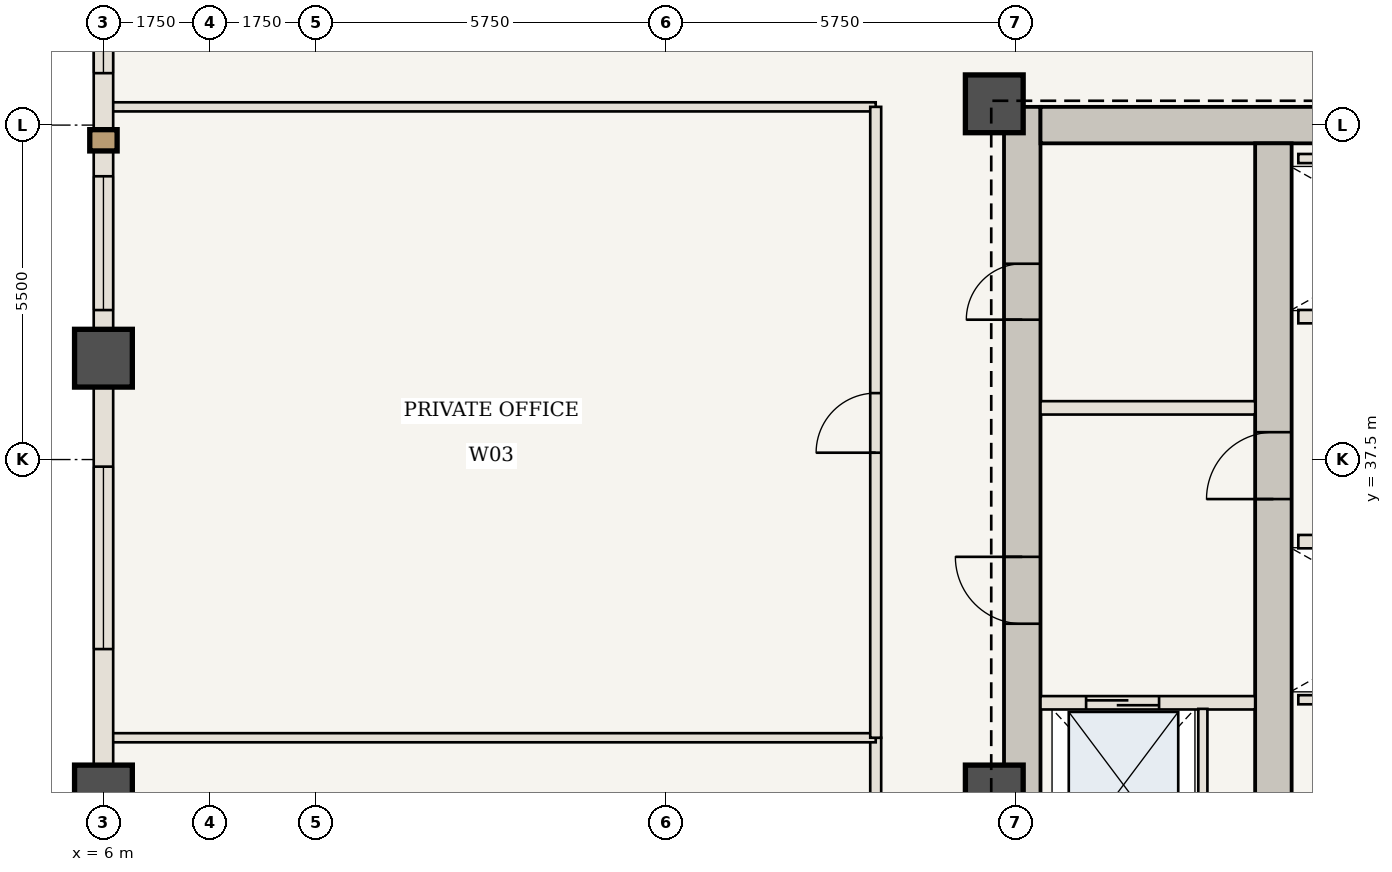
"""IFC4 building model, lengths in metres.
Left out: names, types, materials, properties, quantities, classifications, styles, units other than length and angle.
Written with IfcOpenShell. Run it as: python <this file> out.ifc"""

import sys

from ifc_helpers import new_model, si_unit, direction, frame, frame_2d, origin, origin_2d, place, context, subcontext, project, spatial, rectangle, extrude, element, fill, save


model = new_model("IFC4")
c1 = context("Model", 3, precision=1e-05, world=origin(), true_north=direction((0.0, 1.0)))
c2 = subcontext(c1, "Body", "Model", "MODEL_VIEW")
j1 = project(units=[si_unit("LENGTHUNIT", "METRE"), si_unit("PLANEANGLEUNIT", "RADIAN")], contexts=[c1])
p1 = place(None, origin())
s1 = spatial("IfcSite", under=j1, at=p1, CompositionType="ELEMENT")
p2 = place(p1, origin())
s2 = spatial("IfcBuilding", under=s1, at=p2, CompositionType="ELEMENT")
p3 = place(p2, frame((0.0, 0.0, 137.55)))
s3 = spatial("IfcBuildingStorey", under=s2, at=p3, CompositionType="ELEMENT", Elevation=137.55)
p4 = place(p3, frame((21.11, 30.6, 0.0), z_axis=(0.0, 0.0, 1.0), x_axis=(0.0, 1.0, 0.0)))
e1 = element("IfcWall", 1, at=p4, inside=s3, PredefinedType="SHEAR", context=c2, shape_type="SweptSolid", body=[
    extrude(rectangle(XDim=12.7, YDim=0.6, at=frame_2d((6.35, 0.0))), origin(), (0.0, 0.0, 1.0), 3.85),
])
p5 = place(p4, frame((4.2, 0.0, 0.0)))
e2 = element("IfcOpeningElement", 2, at=p5, cuts=e1, PredefinedType="OPENING", context=c2, shape_type="SweptSolid", body=[
    extrude(rectangle(XDim=1.1, YDim=2.15, at=frame_2d((0.55, 1.075))), frame((0.0, 0.31, 0.0), z_axis=(0.0, -1.0, 0.0), x_axis=(1.0, 0.0, 0.0)), (0.0, 0.0, 1.0), 0.62),
])
p6 = place(p4, frame((9.2, 0.0, 0.0)))
e3 = element("IfcOpeningElement", 3, at=p6, cuts=e1, PredefinedType="OPENING", context=c2, shape_type="SweptSolid", body=[
    extrude(rectangle(XDim=0.92, YDim=2.1, at=frame_2d((0.46, 1.05))), frame((0.0, 0.31, 0.0), z_axis=(0.0, -1.0, 0.0), x_axis=(1.0, 0.0, 0.0)), (0.0, 0.0, 1.0), 0.62),
])
p7 = place(p3, frame((21.41, 43.0, 0.0), z_axis=(0.0, 0.0, 1.0), x_axis=(1.0, 0.0, 0.0)))
e4 = element("IfcWall", 4, at=p7, inside=s3, PredefinedType="SHEAR", context=c2, shape_type="SweptSolid", body=[
    extrude(rectangle(XDim=8.24, YDim=0.6, at=frame_2d((4.12, 0.0))), origin(), (0.0, 0.0, 1.0), 3.85),
])
p8 = place(p3, frame((25.24, 30.6, 0.0), z_axis=(0.0, 0.0, 1.0), x_axis=(0.0, 1.0, 0.0)))
e5 = element("IfcWall", 5, at=p8, inside=s3, PredefinedType="SHEAR", context=c2, shape_type="SweptSolid", body=[
    extrude(rectangle(XDim=12.1, YDim=0.6, at=frame_2d((6.05, 0.0))), origin(), (0.0, 0.0, 1.0), 3.85),
])
p9 = place(p8, frame((6.25, 0.0, 0.0)))
e6 = element("IfcOpeningElement", 6, at=p9, cuts=e5, PredefinedType="OPENING", context=c2, shape_type="SweptSolid", body=[
    extrude(rectangle(XDim=1.1, YDim=2.15, at=frame_2d((0.55, 1.075))), frame((0.0, 0.31, 0.0), z_axis=(0.0, -1.0, 0.0), x_axis=(1.0, 0.0, 0.0)), (0.0, 0.0, 1.0), 0.62),
])
for number, where, z_axis, x_axis in (
    (7, (20.65, 43.35, 0.0), (0.0, 0.0, 1.0), (1.0, 0.0, 0.0)),
    (8, (20.65, 32.0, 0.0), (0.0, 0.0, 1.0), (1.0, 0.0, 0.0)),
    (9, (6.0, 32.0, 0.0), (0.0, 0.0, 1.0), (1.0, 0.0, 0.0)),
    (10, (6.0, 39.167, 0.0), (0.0, 0.0, 1.0), (1.0, 0.0, 0.0)),
):
    element("IfcColumn", number, at=place(p3, frame(where, z_axis=z_axis, x_axis=x_axis)), inside=s3, PredefinedType="COLUMN", context=c2, shape_type="SweptSolid", body=[
        extrude(rectangle(XDim=0.95, YDim=0.95, at=origin_2d()), origin(), (0.0, 0.0, 1.0), 3.85),
    ])
p10 = place(p3, frame((21.41, 33.5, 0.0), z_axis=(0.0, 0.0, 1.0), x_axis=(1.0, 0.0, 0.0)))
e11 = element("IfcWall", 11, at=p10, inside=s3, PredefinedType="STANDARD", context=c2, shape_type="SweptSolid", body=[
    extrude(rectangle(XDim=3.53, YDim=0.22, at=frame_2d((1.765, 0.0))), origin(), (0.0, 0.0, 1.0), 3.685),
])
p11 = place(p10, frame((0.75, 0.0, 0.0)))
e12 = element("IfcOpeningElement", 12, at=p11, cuts=e11, PredefinedType="OPENING", context=c2, shape_type="SweptSolid", body=[
    extrude(rectangle(XDim=1.2, YDim=2.2, at=frame_2d((0.6, 1.1))), frame((0.0, 0.12, 0.0), z_axis=(0.0, -1.0, 0.0), x_axis=(1.0, 0.0, 0.0)), (0.0, 0.0, 1.0), 0.24),
])
p12 = place(p3, frame((24.08, 30.75, 0.0), z_axis=(0.0, 0.0, 1.0), x_axis=(0.0, 1.0, 0.0)))
e13 = element("IfcWall", 13, at=p12, inside=s3, PredefinedType="STANDARD", context=c2, shape_type="SweptSolid", body=[
    extrude(rectangle(XDim=2.65, YDim=0.15, at=frame_2d((1.325, 0.0))), origin(), (0.0, 0.0, 1.0), 3.685),
])
p13 = place(p3, frame((21.41, 38.35, 0.0), z_axis=(0.0, 0.0, 1.0), x_axis=(1.0, 0.0, 0.0)))
e14 = element("IfcWall", 14, at=p13, inside=s3, PredefinedType="STANDARD", context=c2, shape_type="SweptSolid", body=[
    extrude(rectangle(XDim=3.53, YDim=0.22, at=frame_2d((1.765, 0.0))), origin(), (0.0, 0.0, 1.0), 3.685),
])
p14 = place(p3, frame((25.65, 36.15, 0.0), z_axis=(0.0, 0.0, 1.0), x_axis=(1.0, 0.0, 0.0)))
e15 = element("IfcWall", 15, at=p14, inside=s3, PredefinedType="STANDARD", context=c2, shape_type="SweptSolid", body=[
    extrude(rectangle(XDim=4.3, YDim=0.22, at=frame_2d((2.15, 0.0))), origin(), (0.0, 0.0, 1.0), 3.685),
])
p15 = place(p3, frame((25.65, 33.55, 0.0), z_axis=(0.0, 0.0, 1.0), x_axis=(1.0, 0.0, 0.0)))
e16 = element("IfcWall", 16, at=p15, inside=s3, PredefinedType="STANDARD", context=c2, shape_type="SweptSolid", body=[
    extrude(rectangle(XDim=4.2, YDim=0.15, at=frame_2d((2.1, 0.0))), origin(), (0.0, 0.0, 1.0), 3.685),
])
p16 = place(p3, frame((25.65, 39.85, 0.0), z_axis=(0.0, 0.0, 1.0), x_axis=(1.0, 0.0, 0.0)))
e17 = element("IfcWall", 17, at=p16, inside=s3, PredefinedType="STANDARD", context=c2, shape_type="SweptSolid", body=[
    extrude(rectangle(XDim=4.3, YDim=0.22, at=frame_2d((2.15, 0.0))), origin(), (0.0, 0.0, 1.0), 3.685),
])
p17 = place(p3, frame((25.65, 42.45, 0.0), z_axis=(0.0, 0.0, 1.0), x_axis=(1.0, 0.0, 0.0)))
e18 = element("IfcWall", 18, at=p17, inside=s3, PredefinedType="STANDARD", context=c2, shape_type="SweptSolid", body=[
    extrude(rectangle(XDim=4.2, YDim=0.15, at=frame_2d((2.1, 0.0))), origin(), (0.0, 0.0, 1.0), 3.685),
])
p18 = place(p3, frame((6.06, 43.3, 0.0), z_axis=(0.0, 0.0, 1.0), x_axis=(1.0, 0.0, 0.0)))
e19 = element("IfcWall", 19, at=p18, inside=s3, PredefinedType="STANDARD", context=c2, shape_type="SweptSolid", body=[
    extrude(rectangle(XDim=12.64, YDim=0.15, at=frame_2d((6.32, 0.0))), origin(), (0.0, 0.0, 1.0), 3.065),
])
p19 = place(p3, frame((18.7, 24.058, 0.0), z_axis=(0.0, 0.0, 1.0), x_axis=(0.0, 1.0, 0.0)))
e20 = element("IfcWall", 20, at=p19, inside=s3, PredefinedType="STANDARD", context=c2, shape_type="SweptSolid", body=[
    extrude(rectangle(XDim=8.867, YDim=0.18, at=frame_2d((4.433, 0.0))), origin(), (0.0, 0.0, 1.0), 3.685),
])
p20 = place(p19, frame((3.933, 0.0, 0.0)))
e21 = element("IfcOpeningElement", 21, at=p20, cuts=e20, PredefinedType="OPENING", context=c2, shape_type="SweptSolid", body=[
    extrude(rectangle(XDim=0.98, YDim=2.2, at=frame_2d((0.49, 1.1))), frame((0.0, 0.1, 0.0), z_axis=(0.0, -1.0, 0.0), x_axis=(1.0, 0.0, 0.0)), (0.0, 0.0, 1.0), 0.2),
])
p21 = place(p3, frame((6.06, 32.925, 0.0), z_axis=(0.0, 0.0, 1.0), x_axis=(1.0, 0.0, 0.0)))
e22 = element("IfcWall", 22, at=p21, inside=s3, PredefinedType="STANDARD", context=c2, shape_type="SweptSolid", body=[
    extrude(rectangle(XDim=12.64, YDim=0.15, at=frame_2d((6.32, 0.0))), origin(), (0.0, 0.0, 1.0), 3.685),
])
p22 = place(p3, frame((18.7, 32.925, 0.0), z_axis=(0.0, 0.0, 1.0), x_axis=(0.0, 1.0, 0.0)))
e23 = element("IfcWall", 23, at=p22, inside=s3, PredefinedType="STANDARD", context=c2, shape_type="SweptSolid", body=[
    extrude(rectangle(XDim=10.375, YDim=0.18, at=frame_2d((5.188, 0.0))), origin(), (0.0, 0.0, 1.0), 3.685),
])
p23 = place(p22, frame((4.688, 0.0, 0.0)))
e24 = element("IfcOpeningElement", 24, at=p23, cuts=e23, PredefinedType="OPENING", context=c2, shape_type="SweptSolid", body=[
    extrude(rectangle(XDim=0.98, YDim=2.2, at=frame_2d((0.49, 1.1))), frame((0.0, 0.1, 0.0), z_axis=(0.0, -1.0, 0.0), x_axis=(1.0, 0.0, 0.0)), (0.0, 0.0, 1.0), 0.2),
])
p24 = place(p3, frame((6.0, 32.0, 0.0), z_axis=(0.0, 0.0, 1.0), x_axis=(0.0, 1.0, 0.0)))
e25 = element("IfcWall", 25, at=p24, inside=s3, PredefinedType="USERDEFINED", context=c2, shape_type="SweptSolid", body=[
    extrude(rectangle(XDim=7.167, YDim=0.32, at=frame_2d((3.583, 0.0))), origin(), (0.0, 0.0, 1.0), 2.885),
])
p25 = place(p24, frame((2.383, 0.0, 0.85)))
e26 = element("IfcOpeningElement", 26, at=p25, cuts=e25, PredefinedType="OPENING", context=c2, shape_type="SweptSolid", body=[
    extrude(rectangle(XDim=3.0, YDim=1.835, at=frame_2d((1.5, 0.917))), frame((0.0, 0.17, 0.0), z_axis=(0.0, -1.0, 0.0), x_axis=(1.0, 0.0, 0.0)), (0.0, 0.0, 1.0), 0.34),
])
p26 = place(p3, frame((6.0, 39.167, 0.0), z_axis=(0.0, 0.0, 1.0), x_axis=(0.0, 1.0, 0.0)))
e27 = element("IfcWall", 27, at=p26, inside=s3, PredefinedType="USERDEFINED", context=c2, shape_type="SweptSolid", body=[
    extrude(rectangle(XDim=7.167, YDim=0.32, at=frame_2d((3.583, 0.0))), origin(), (0.0, 0.0, 1.0), 2.885),
])
p27 = place(p26, frame((0.792, 0.0, 0.85)))
e28 = element("IfcOpeningElement", 28, at=p27, cuts=e27, PredefinedType="OPENING", context=c2, shape_type="SweptSolid", body=[
    extrude(rectangle(XDim=2.2, YDim=1.835, at=frame_2d((1.1, 0.917))), frame((0.0, 0.17, 0.0), z_axis=(0.0, -1.0, 0.0), x_axis=(1.0, 0.0, 0.0)), (0.0, 0.0, 1.0), 0.34),
])
p28 = place(p26, frame((4.688, 0.0, 0.85)))
e29 = element("IfcOpeningElement", 29, at=p28, cuts=e27, PredefinedType="OPENING", context=c2, shape_type="SweptSolid", body=[
    extrude(rectangle(XDim=1.6, YDim=1.835, at=frame_2d((0.8, 0.917))), frame((0.0, 0.17, 0.0), z_axis=(0.0, -1.0, 0.0), x_axis=(1.0, 0.0, 0.0)), (0.0, 0.0, 1.0), 0.34),
])
p29 = place(p5, origin())
e30 = element("IfcDoor", 30, at=p29, inside=s3, OperationType="SINGLE_SWING_RIGHT", PredefinedType="DOOR", context=c2, shape_type="SweptSolid", body=[
    extrude(rectangle(XDim=1.1, YDim=2.15, at=frame_2d((0.55, 1.075))), frame((0.0, 0.025, 0.0), z_axis=(0.0, -1.0, 0.0), x_axis=(1.0, 0.0, 0.0)), (0.0, 0.0, 1.0), 0.05),
])
fill(e2, e30)
p30 = place(p9, origin())
e31 = element("IfcDoor", 31, at=p30, inside=s3, OperationType="SINGLE_SWING_LEFT", PredefinedType="DOOR", context=c2, shape_type="SweptSolid", body=[
    extrude(rectangle(XDim=1.1, YDim=2.15, at=frame_2d((0.55, 1.075))), frame((0.0, 0.025, 0.0), z_axis=(0.0, -1.0, 0.0), x_axis=(1.0, 0.0, 0.0)), (0.0, 0.0, 1.0), 0.05),
])
fill(e6, e31)
p31 = place(p6, origin())
e32 = element("IfcDoor", 32, at=p31, inside=s3, OperationType="SINGLE_SWING_LEFT", PredefinedType="DOOR", context=c2, shape_type="SweptSolid", body=[
    extrude(rectangle(XDim=0.92, YDim=2.1, at=frame_2d((0.46, 1.05))), frame((0.0, 0.025, 0.0), z_axis=(0.0, -1.0, 0.0), x_axis=(1.0, 0.0, 0.0)), (0.0, 0.0, 1.0), 0.05),
])
fill(e3, e32)
p32 = place(p11, origin())
e33 = element("IfcDoor", 33, at=p32, inside=s3, OperationType="DOUBLE_DOOR_SLIDING", PredefinedType="DOOR", context=c2, shape_type="SweptSolid", body=[
    extrude(rectangle(XDim=1.2, YDim=2.2, at=frame_2d((0.6, 1.1))), frame((0.0, 0.025, 0.0), z_axis=(0.0, -1.0, 0.0), x_axis=(1.0, 0.0, 0.0)), (0.0, 0.0, 1.0), 0.05),
])
fill(e12, e33)
p33 = place(p23, origin())
e34 = element("IfcDoor", 34, at=p33, inside=s3, OperationType="SINGLE_SWING_LEFT", PredefinedType="DOOR", context=c2, shape_type="SweptSolid", body=[
    extrude(rectangle(XDim=0.98, YDim=2.2, at=frame_2d((0.49, 1.1))), frame((0.0, 0.025, 0.0), z_axis=(0.0, -1.0, 0.0), x_axis=(1.0, 0.0, 0.0)), (0.0, 0.0, 1.0), 0.05),
])
fill(e24, e34)
p34 = place(p25, origin())
e35 = element("IfcWindow", 35, at=p34, inside=s3, PartitioningType="SINGLE_PANEL", PredefinedType="WINDOW", context=c2, shape_type="SweptSolid", body=[
    extrude(rectangle(XDim=3.0, YDim=1.835, at=frame_2d((1.5, 0.917))), frame((0.0, 0.03, 0.0), z_axis=(0.0, -1.0, 0.0), x_axis=(1.0, 0.0, 0.0)), (0.0, 0.0, 1.0), 0.06),
])
fill(e26, e35)
p35 = place(p27, origin())
e36 = element("IfcWindow", 36, at=p35, inside=s3, PartitioningType="SINGLE_PANEL", PredefinedType="WINDOW", context=c2, shape_type="SweptSolid", body=[
    extrude(rectangle(XDim=2.2, YDim=1.835, at=frame_2d((1.1, 0.917))), frame((0.0, 0.03, 0.0), z_axis=(0.0, -1.0, 0.0), x_axis=(1.0, 0.0, 0.0)), (0.0, 0.0, 1.0), 0.06),
])
fill(e28, e36)
p36 = place(p28, origin())
e37 = element("IfcWindow", 37, at=p36, inside=s3, PartitioningType="SINGLE_PANEL", PredefinedType="WINDOW", context=c2, shape_type="SweptSolid", body=[
    extrude(rectangle(XDim=1.6, YDim=1.835, at=frame_2d((0.8, 0.917))), frame((0.0, 0.03, 0.0), z_axis=(0.0, -1.0, 0.0), x_axis=(1.0, 0.0, 0.0)), (0.0, 0.0, 1.0), 0.06),
])
fill(e29, e37)
save(model, sys.argv[1])
